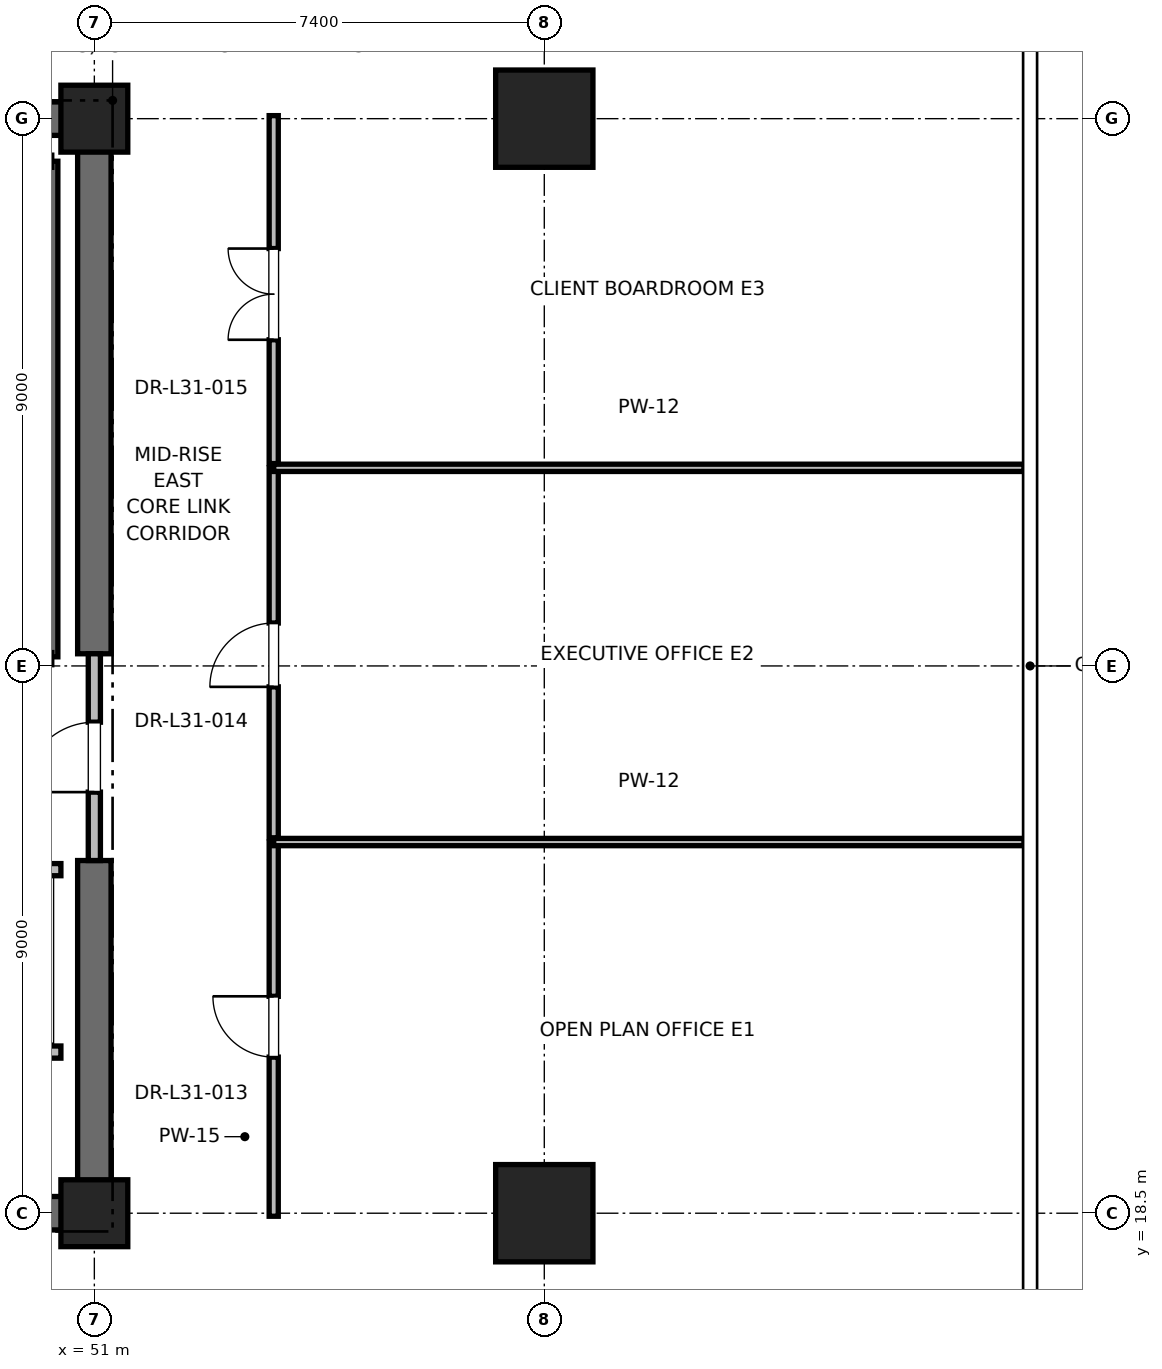
"""IFC4 building model, lengths in metres.
Left out: names, types, materials, properties, quantities, classifications, styles, units other than length and angle.
Written with IfcOpenShell. Run it as: python <this file> out.ifc"""

import sys

from ifc_helpers import new_model, si_unit, direction, frame, frame_2d, origin, origin_2d, place, context, subcontext, project, spatial, rectangle, extrude, element, fill, save


model = new_model("IFC4")
c1 = context("Model", 3, precision=1e-05, world=origin(), true_north=direction((0.0, 1.0)))
c2 = subcontext(c1, "Body", "Model", "MODEL_VIEW")
j1 = project(units=[si_unit("LENGTHUNIT", "METRE"), si_unit("PLANEANGLEUNIT", "RADIAN")], contexts=[c1])
p1 = place(None, origin())
s1 = spatial("IfcSite", under=j1, at=p1, CompositionType="ELEMENT")
p2 = place(p1, origin())
s2 = spatial("IfcBuilding", under=s1, at=p2, CompositionType="ELEMENT")
p3 = place(p2, frame((0.0, 0.0, 136.4)))
s3 = spatial("IfcBuildingStorey", under=s2, at=p3, CompositionType="ELEMENT", Elevation=136.4)
for number, where, z_axis, x_axis in (
    (1, (58.4, 18.5, 0.0), (0.0, 0.0, 1.0), (1.0, 0.0, 0.0)),
    (2, (58.4, 36.5, 0.0), (0.0, 0.0, 1.0), (1.0, 0.0, 0.0)),
):
    element("IfcColumn", number, at=place(p3, frame(where, z_axis=z_axis, x_axis=x_axis)), inside=s3, PredefinedType="COLUMN", context=c2, shape_type="SweptSolid", body=[
        extrude(rectangle(XDim=1.6, YDim=1.6, at=origin_2d()), origin(), (0.0, 0.0, 1.0), 4.0),
    ])
for number, where, z_axis, x_axis in (
    (3, (51.0, 18.5, 0.0), (0.0, 0.0, 1.0), (1.0, 0.0, 0.0)),
    (4, (51.0, 36.5, 0.0), (0.0, 0.0, 1.0), (1.0, 0.0, 0.0)),
):
    element("IfcColumn", number, at=place(p3, frame(where, z_axis=z_axis, x_axis=x_axis)), inside=s3, PredefinedType="PILASTER", context=c2, shape_type="SweptSolid", body=[
        extrude(rectangle(XDim=1.1, YDim=1.1, at=origin_2d()), origin(), (0.0, 0.0, 1.0), 4.0),
    ])
p4 = place(p3, frame((41.8, 18.5, 0.0), z_axis=(0.0, 0.0, 1.0), x_axis=(1.0, 0.0, 0.0)))
e5 = element("IfcWall", 5, at=p4, inside=s3, PredefinedType="SHEAR", context=c2, shape_type="SweptSolid", body=[
    extrude(rectangle(XDim=9.2, YDim=0.55, at=frame_2d((4.6, 0.0))), origin(), (0.0, 0.0, 1.0), 3.775),
])
for number, where, z_axis, x_axis in (
    (6, (45.2, 36.5, 0.0), (0.0, 0.0, 1.0), (1.0, 0.0, 0.0)),
    (7, (51.0, 18.5, 0.0), (0.0, 0.0, 1.0), (0.0, 1.0, 0.0)),
):
    element("IfcWall", number, at=place(p3, frame(where, z_axis=z_axis, x_axis=x_axis)), inside=s3, PredefinedType="SHEAR", context=c2, shape_type="SweptSolid", body=[
        extrude(rectangle(XDim=5.8, YDim=0.55, at=frame_2d((2.9, 0.0))), origin(), (0.0, 0.0, 1.0), 3.775),
    ])
p5 = place(p3, frame((51.0, 27.7, 0.0), z_axis=(0.0, 0.0, 1.0), x_axis=(0.0, 1.0, 0.0)))
e8 = element("IfcWall", 8, at=p5, inside=s3, PredefinedType="SHEAR", context=c2, shape_type="SweptSolid", body=[
    extrude(rectangle(XDim=8.8, YDim=0.55, at=frame_2d((4.4, 0.0))), origin(), (0.0, 0.0, 1.0), 3.775),
])
p6 = place(p3, frame((50.3, 27.65, 0.0), z_axis=(0.0, 0.0, 1.0), x_axis=(0.0, 1.0, 0.0)))
e9 = element("IfcWall", 9, at=p6, inside=s3, PredefinedType="SOLIDWALL", context=c2, shape_type="SweptSolid", body=[
    extrude(rectangle(XDim=8.15, YDim=0.2, at=frame_2d((4.075, 0.0))), origin(), (0.0, 0.0, 1.0), 3.775),
])
p7 = place(p3, frame((51.0, 24.3, 0.0), z_axis=(0.0, 0.0, 1.0), x_axis=(0.0, 1.0, 0.0)))
e10 = element("IfcWall", 10, at=p7, inside=s3, PredefinedType="PARTITIONING", context=c2, shape_type="SweptSolid", body=[
    extrude(rectangle(XDim=3.4, YDim=0.2, at=frame_2d((1.7, 0.0))), origin(), (0.0, 0.0, 1.0), 2.755),
])
p8 = place(p7, frame((1.125, 0.0, 0.0)))
e11 = element("IfcOpeningElement", 11, at=p8, cuts=e10, PredefinedType="OPENING", context=c2, shape_type="SweptSolid", body=[
    extrude(rectangle(XDim=1.15, YDim=2.2, at=frame_2d((0.575, 1.1))), frame((0.0, 0.1, 0.0), z_axis=(0.0, -1.0, 0.0), x_axis=(1.0, 0.0, 0.0)), (0.0, 0.0, 1.0), 0.2),
])
p9 = place(p3, frame((47.85, 21.15, 0.0), z_axis=(0.0, 0.0, 1.0), x_axis=(1.0, 0.0, 0.0)))
e12 = element("IfcWall", 12, at=p9, inside=s3, PredefinedType="SOLIDWALL", context=c2, shape_type="SweptSolid", body=[
    extrude(rectangle(XDim=2.6, YDim=0.2, at=frame_2d((1.3, 0.0))), origin(), (0.0, 0.0, 1.0), 3.775),
])
p10 = place(p3, frame((50.45, 24.15, 0.0), z_axis=(0.0, 0.0, 1.0), x_axis=(-1.0, 0.0, 0.0)))
e13 = element("IfcWall", 13, at=p10, inside=s3, PredefinedType="SOLIDWALL", context=c2, shape_type="SweptSolid", body=[
    extrude(rectangle(XDim=2.6, YDim=0.2, at=frame_2d((1.3, 0.0))), origin(), (0.0, 0.0, 1.0), 2.755),
])
p11 = place(p10, frame((0.75, 0.0, 0.0)))
e14 = element("IfcOpeningElement", 14, at=p11, cuts=e13, PredefinedType="OPENING", context=c2, shape_type="SweptSolid", body=[
    extrude(rectangle(XDim=1.1, YDim=2.2, at=frame_2d((0.55, 1.1))), frame((0.0, 0.1, 0.0), z_axis=(0.0, -1.0, 0.0), x_axis=(1.0, 0.0, 0.0)), (0.0, 0.0, 1.0), 0.2),
])
p12 = place(p3, frame((53.95, 18.45, 0.0), z_axis=(0.0, 0.0, 1.0), x_axis=(0.0, 1.0, 0.0)))
e15 = element("IfcWall", 15, at=p12, inside=s3, PredefinedType="PARTITIONING", context=c2, shape_type="SweptSolid", body=[
    extrude(rectangle(XDim=6.154, YDim=0.15, at=frame_2d((3.077, 0.0))), origin(), (0.0, 0.0, 1.0), 2.85),
])
p13 = place(p12, frame((2.617, 0.0, 0.0)))
e16 = element("IfcOpeningElement", 16, at=p13, cuts=e15, PredefinedType="OPENING", context=c2, shape_type="SweptSolid", body=[
    extrude(rectangle(XDim=1.0, YDim=2.15, at=frame_2d((0.5, 1.075))), frame((0.0, 0.075, 0.0), z_axis=(0.0, -1.0, 0.0), x_axis=(1.0, 0.0, 0.0)), (0.0, 0.0, 1.0), 0.15),
])
p14 = place(p3, frame((53.95, 24.604, 0.0), z_axis=(0.0, 0.0, 1.0), x_axis=(1.0, 0.0, 0.0)))
e17 = element("IfcWall", 17, at=p14, inside=s3, PredefinedType="PARTITIONING", context=c2, shape_type="SweptSolid", body=[
    extrude(rectangle(XDim=12.34, YDim=0.12, at=frame_2d((6.17, 0.0))), origin(), (0.0, 0.0, 1.0), 2.85),
])
p15 = place(p3, frame((53.95, 24.674, 0.0), z_axis=(0.0, 0.0, 1.0), x_axis=(0.0, 1.0, 0.0)))
e18 = element("IfcWall", 18, at=p15, inside=s3, PredefinedType="PARTITIONING", context=c2, shape_type="SweptSolid", body=[
    extrude(rectangle(XDim=6.084, YDim=0.15, at=frame_2d((3.042, 0.0))), origin(), (0.0, 0.0, 1.0), 2.85),
])
p16 = place(p15, frame((2.482, 0.0, 0.0)))
e19 = element("IfcOpeningElement", 19, at=p16, cuts=e18, PredefinedType="OPENING", context=c2, shape_type="SweptSolid", body=[
    extrude(rectangle(XDim=1.05, YDim=2.2, at=frame_2d((0.525, 1.1))), frame((0.0, 0.075, 0.0), z_axis=(0.0, -1.0, 0.0), x_axis=(1.0, 0.0, 0.0)), (0.0, 0.0, 1.0), 0.15),
])
p17 = place(p3, frame((53.95, 30.758, 0.0), z_axis=(0.0, 0.0, 1.0), x_axis=(1.0, 0.0, 0.0)))
e20 = element("IfcWall", 20, at=p17, inside=s3, PredefinedType="PARTITIONING", context=c2, shape_type="SweptSolid", body=[
    extrude(rectangle(XDim=12.34, YDim=0.12, at=frame_2d((6.17, 0.0))), origin(), (0.0, 0.0, 1.0), 2.85),
])
p18 = place(p3, frame((53.95, 30.828, 0.0), z_axis=(0.0, 0.0, 1.0), x_axis=(0.0, 1.0, 0.0)))
e21 = element("IfcWall", 21, at=p18, inside=s3, PredefinedType="PARTITIONING", context=c2, shape_type="SweptSolid", body=[
    extrude(rectangle(XDim=5.722, YDim=0.15, at=frame_2d((2.861, 0.0))), origin(), (0.0, 0.0, 1.0), 2.85),
])
p19 = place(p18, frame((2.036, 0.0, 0.0)))
e22 = element("IfcOpeningElement", 22, at=p19, cuts=e21, PredefinedType="OPENING", context=c2, shape_type="SweptSolid", body=[
    extrude(rectangle(XDim=1.5, YDim=2.25, at=frame_2d((0.75, 1.125))), frame((0.0, 0.075, 0.0), z_axis=(0.0, -1.0, 0.0), x_axis=(1.0, 0.0, 0.0)), (0.0, 0.0, 1.0), 0.15),
])
p20 = place(p8, origin())
e23 = element("IfcDoor", 23, at=p20, inside=s3, OperationType="SINGLE_SWING_LEFT", PredefinedType="DOOR", context=c2, shape_type="SweptSolid", body=[
    extrude(rectangle(XDim=1.15, YDim=2.2, at=frame_2d((0.575, 1.1))), frame((0.0, 0.025, 0.0), z_axis=(0.0, -1.0, 0.0), x_axis=(1.0, 0.0, 0.0)), (0.0, 0.0, 1.0), 0.05),
])
fill(e11, e23)
p21 = place(p13, origin())
e24 = element("IfcDoor", 24, at=p21, inside=s3, OperationType="SINGLE_SWING_RIGHT", PredefinedType="DOOR", context=c2, shape_type="SweptSolid", body=[
    extrude(rectangle(XDim=1.0, YDim=2.15, at=frame_2d((0.5, 1.075))), frame((0.0, 0.025, 0.0), z_axis=(0.0, -1.0, 0.0), x_axis=(1.0, 0.0, 0.0)), (0.0, 0.0, 1.0), 0.05),
])
fill(e16, e24)
p22 = place(p16, origin())
e25 = element("IfcDoor", 25, at=p22, inside=s3, OperationType="SINGLE_SWING_LEFT", PredefinedType="DOOR", context=c2, shape_type="SweptSolid", body=[
    extrude(rectangle(XDim=1.05, YDim=2.2, at=frame_2d((0.525, 1.1))), frame((0.0, 0.025, 0.0), z_axis=(0.0, -1.0, 0.0), x_axis=(1.0, 0.0, 0.0)), (0.0, 0.0, 1.0), 0.05),
])
fill(e19, e25)
p23 = place(p19, origin())
e26 = element("IfcDoor", 26, at=p23, inside=s3, OperationType="DOUBLE_DOOR_SINGLE_SWING", PredefinedType="DOOR", context=c2, shape_type="SweptSolid", body=[
    extrude(rectangle(XDim=1.5, YDim=2.25, at=frame_2d((0.75, 1.125))), frame((0.0, 0.025, 0.0), z_axis=(0.0, -1.0, 0.0), x_axis=(1.0, 0.0, 0.0)), (0.0, 0.0, 1.0), 0.05),
])
fill(e22, e26)
save(model, sys.argv[1])
